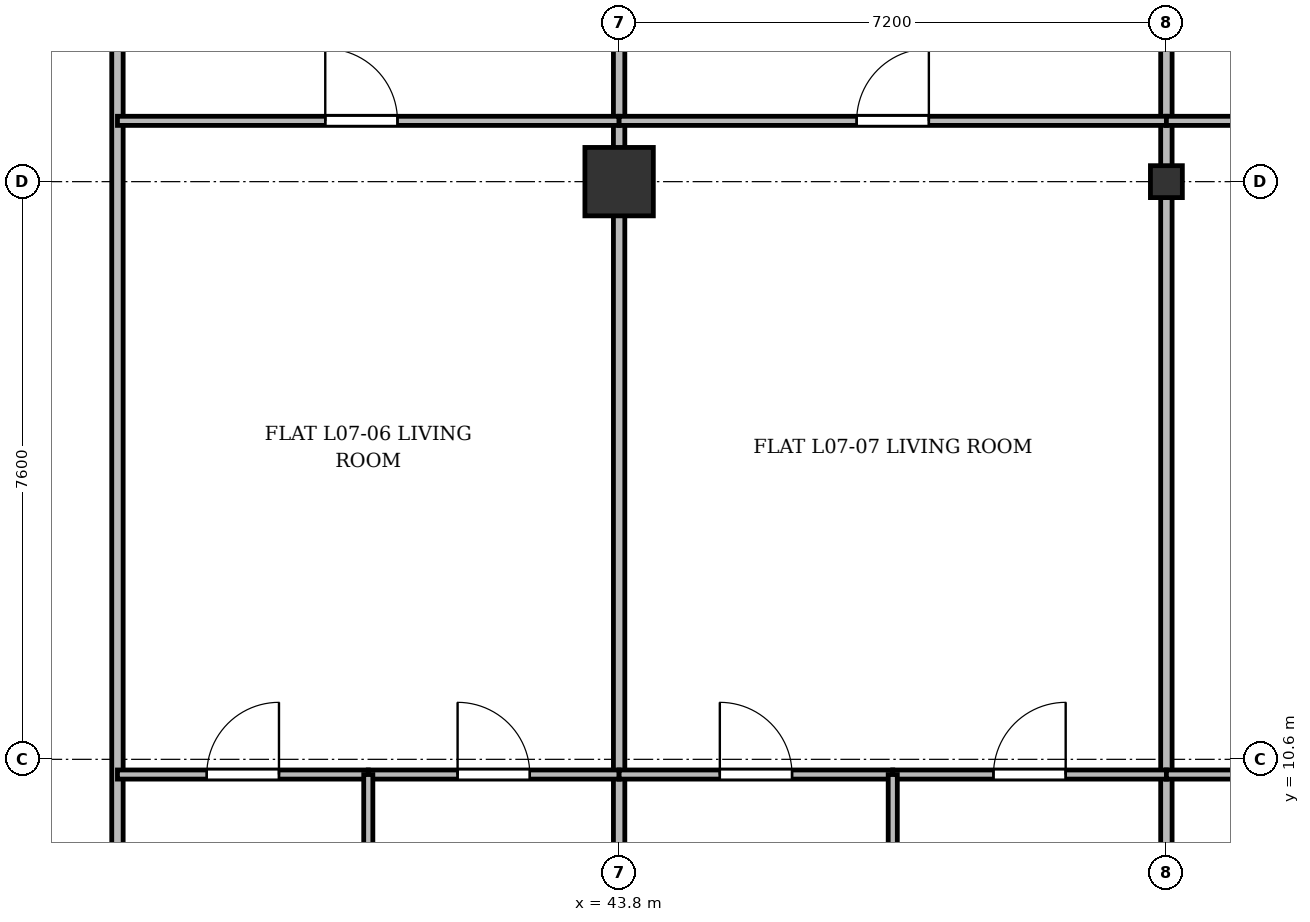
"""IFC4 building model, lengths in metres.
Left out: names, types, materials, properties, quantities, classifications, styles, units other than length and angle.
Written with IfcOpenShell. Run it as: python <this file> out.ifc"""

import sys

from ifc_helpers import new_model, si_unit, direction, frame, frame_2d, origin, origin_2d, place, context, subcontext, project, spatial, rectangle, i_section, extrude, source, transform, mapped, element, fill, save


model = new_model("IFC4")
c1 = context("Model", 3, precision=1e-05, world=origin(), true_north=direction((0.0, 1.0)))
c2 = subcontext(c1, "Body", "Model", "MODEL_VIEW")
j1 = project(units=[si_unit("LENGTHUNIT", "METRE"), si_unit("PLANEANGLEUNIT", "RADIAN")], contexts=[c1])
p1 = place(None, origin())
s1 = spatial("IfcSite", under=j1, at=p1, CompositionType="ELEMENT")
p2 = place(p1, origin())
s2 = spatial("IfcBuilding", under=s1, at=p2, CompositionType="ELEMENT")
p3 = place(p2, frame((0.0, 0.0, 30.7)))
s3 = spatial("IfcBuildingStorey", under=s2, at=p3, CompositionType="ELEMENT", Elevation=30.7)
m1 = source(origin(), c2, "Body", "SweptSolid", [
    extrude(rectangle(XDim=0.9, YDim=0.9, at=origin_2d()), origin(), (0.0, 0.0, 1.0), 3.6),
])
p4 = place(p3, frame((43.8, 18.2, 0.0), z_axis=(0.0, 0.0, 1.0), x_axis=(1.0, 0.0, 0.0)))
e1 = element("IfcColumn", 1, at=p4, inside=s3, PredefinedType="COLUMN", context=c2, shape_type="MappedRepresentation", body=[
    mapped(m1, transform((0.0, 0.0, 0.0), x_axis=(1.0, 0.0, 0.0), y_axis=(0.0, 1.0, 0.0), z_axis=(0.0, 0.0, 1.0), scale=1.0)),
])
m2 = source(origin(), c2, "Body", "SweptSolid", [
    extrude(i_section(OverallWidth=0.42, OverallDepth=0.42, WebThickness=0.026, FlangeThickness=0.04, at=origin_2d()), origin(), (0.0, 0.0, 1.0), 3.6),
])
p5 = place(p3, frame((51.0, 18.2, 0.0), z_axis=(0.0, 0.0, 1.0), x_axis=(1.0, 0.0, 0.0)))
e2 = element("IfcColumn", 2, at=p5, inside=s3, PredefinedType="COLUMN", context=c2, shape_type="MappedRepresentation", body=[
    mapped(m2, transform((0.0, 0.0, 0.0), x_axis=(1.0, 0.0, 0.0), y_axis=(0.0, 1.0, 0.0), z_axis=(0.0, 0.0, 1.0), scale=1.0)),
])
p6 = place(p3, frame((37.2, 3.145, 0.0), z_axis=(0.0, 0.0, 1.0), x_axis=(0.0, 1.0, 0.0)))
e3 = element("IfcWall", 3, at=p6, inside=s3, PredefinedType="PARTITIONING", context=c2, shape_type="SweptSolid", body=[
    extrude(rectangle(XDim=24.455, YDim=0.15, at=frame_2d((12.228, 0.0))), origin(), (0.0, 0.0, 1.0), 2.69),
])
for number, where, z_axis, x_axis in (
    (4, (43.8, 3.145, 0.0), (0.0, 0.0, 1.0), (0.0, 1.0, 0.0)),
    (5, (51.0, 3.145, 0.0), (0.0, 0.0, 1.0), (0.0, 1.0, 0.0)),
):
    element("IfcWall", number, at=place(p3, frame(where, z_axis=z_axis, x_axis=x_axis)), inside=s3, PredefinedType="PARTITIONING", context=c2, shape_type="SweptSolid", body=[
        extrude(rectangle(XDim=24.455, YDim=0.15, at=frame_2d((12.228, 0.0))), origin(), (0.0, 0.0, 1.0), 2.752),
    ])
p7 = place(p3, frame((37.2, 19.0, 0.0), z_axis=(0.0, 0.0, 1.0), x_axis=(1.0, 0.0, 0.0)))
e6 = element("IfcWall", 6, at=p7, inside=s3, PredefinedType="PARTITIONING", context=c2, shape_type="SweptSolid", body=[
    extrude(rectangle(XDim=6.6, YDim=0.12, at=frame_2d((3.3, 0.0))), origin(), (0.0, 0.0, 1.0), 2.752),
])
p8 = place(p7, frame((2.734, 0.0, 0.0)))
e7 = element("IfcOpeningElement", 7, at=p8, cuts=e6, PredefinedType="OPENING", context=c2, shape_type="SweptSolid", body=[
    extrude(rectangle(XDim=0.95, YDim=2.15, at=frame_2d((0.475, 1.075))), frame((0.0, 0.07, 0.0), z_axis=(0.0, -1.0, 0.0), x_axis=(1.0, 0.0, 0.0)), (0.0, 0.0, 1.0), 0.14),
])
p9 = place(p3, frame((37.2, 10.4, 0.0), z_axis=(0.0, 0.0, 1.0), x_axis=(1.0, 0.0, 0.0)))
e8 = element("IfcWall", 8, at=p9, inside=s3, PredefinedType="PARTITIONING", context=c2, shape_type="SweptSolid", body=[
    extrude(rectangle(XDim=3.3, YDim=0.12, at=frame_2d((1.65, 0.0))), origin(), (0.0, 0.0, 1.0), 3.34),
])
p10 = place(p9, frame((1.175, 0.0, 0.0)))
e9 = element("IfcOpeningElement", 9, at=p10, cuts=e8, PredefinedType="OPENING", context=c2, shape_type="SweptSolid", body=[
    extrude(rectangle(XDim=0.95, YDim=2.15, at=frame_2d((0.475, 1.075))), frame((0.0, 0.07, 0.0), z_axis=(0.0, -1.0, 0.0), x_axis=(1.0, 0.0, 0.0)), (0.0, 0.0, 1.0), 0.14),
])
p11 = place(p3, frame((40.5, 10.4, 0.0), z_axis=(0.0, 0.0, 1.0), x_axis=(1.0, 0.0, 0.0)))
e10 = element("IfcWall", 10, at=p11, inside=s3, PredefinedType="PARTITIONING", context=c2, shape_type="SweptSolid", body=[
    extrude(rectangle(XDim=3.3, YDim=0.12, at=frame_2d((1.65, 0.0))), origin(), (0.0, 0.0, 1.0), 2.752),
])
p12 = place(p11, frame((1.175, 0.0, 0.0)))
e11 = element("IfcOpeningElement", 11, at=p12, cuts=e10, PredefinedType="OPENING", context=c2, shape_type="SweptSolid", body=[
    extrude(rectangle(XDim=0.95, YDim=2.15, at=frame_2d((0.475, 1.075))), frame((0.0, 0.07, 0.0), z_axis=(0.0, -1.0, 0.0), x_axis=(1.0, 0.0, 0.0)), (0.0, 0.0, 1.0), 0.14),
])
p13 = place(p3, frame((40.5, 3.145, 0.0), z_axis=(0.0, 0.0, 1.0), x_axis=(0.0, 1.0, 0.0)))
e12 = element("IfcWall", 12, at=p13, inside=s3, PredefinedType="PARTITIONING", context=c2, shape_type="SweptSolid", body=[
    extrude(rectangle(XDim=7.255, YDim=0.12, at=frame_2d((3.627, 0.0))), origin(), (0.0, 0.0, 1.0), 2.69),
])
p14 = place(p3, frame((43.8, 19.0, 0.0), z_axis=(0.0, 0.0, 1.0), x_axis=(1.0, 0.0, 0.0)))
e13 = element("IfcWall", 13, at=p14, inside=s3, PredefinedType="PARTITIONING", context=c2, shape_type="SweptSolid", body=[
    extrude(rectangle(XDim=7.2, YDim=0.12, at=frame_2d((3.6, 0.0))), origin(), (0.0, 0.0, 1.0), 2.752),
])
p15 = place(p14, frame((3.125, 0.0, 0.0)))
e14 = element("IfcOpeningElement", 14, at=p15, cuts=e13, PredefinedType="OPENING", context=c2, shape_type="SweptSolid", body=[
    extrude(rectangle(XDim=0.95, YDim=2.15, at=frame_2d((0.475, 1.075))), frame((0.0, 0.07, 0.0), z_axis=(0.0, -1.0, 0.0), x_axis=(1.0, 0.0, 0.0)), (0.0, 0.0, 1.0), 0.14),
])
p16 = place(p3, frame((43.8, 10.4, 0.0), z_axis=(0.0, 0.0, 1.0), x_axis=(1.0, 0.0, 0.0)))
e15 = element("IfcWall", 15, at=p16, inside=s3, PredefinedType="PARTITIONING", context=c2, shape_type="SweptSolid", body=[
    extrude(rectangle(XDim=3.6, YDim=0.12, at=frame_2d((1.8, 0.0))), origin(), (0.0, 0.0, 1.0), 2.752),
])
p17 = place(p16, frame((1.325, 0.0, 0.0)))
e16 = element("IfcOpeningElement", 16, at=p17, cuts=e15, PredefinedType="OPENING", context=c2, shape_type="SweptSolid", body=[
    extrude(rectangle(XDim=0.95, YDim=2.15, at=frame_2d((0.475, 1.075))), frame((0.0, 0.07, 0.0), z_axis=(0.0, -1.0, 0.0), x_axis=(1.0, 0.0, 0.0)), (0.0, 0.0, 1.0), 0.14),
])
p18 = place(p3, frame((47.4, 10.4, 0.0), z_axis=(0.0, 0.0, 1.0), x_axis=(1.0, 0.0, 0.0)))
e17 = element("IfcWall", 17, at=p18, inside=s3, PredefinedType="PARTITIONING", context=c2, shape_type="SweptSolid", body=[
    extrude(rectangle(XDim=3.6, YDim=0.12, at=frame_2d((1.8, 0.0))), origin(), (0.0, 0.0, 1.0), 2.752),
])
p19 = place(p18, frame((1.325, 0.0, 0.0)))
e18 = element("IfcOpeningElement", 18, at=p19, cuts=e17, PredefinedType="OPENING", context=c2, shape_type="SweptSolid", body=[
    extrude(rectangle(XDim=0.95, YDim=2.15, at=frame_2d((0.475, 1.075))), frame((0.0, 0.07, 0.0), z_axis=(0.0, -1.0, 0.0), x_axis=(1.0, 0.0, 0.0)), (0.0, 0.0, 1.0), 0.14),
])
p20 = place(p3, frame((47.4, 3.145, 0.0), z_axis=(0.0, 0.0, 1.0), x_axis=(0.0, 1.0, 0.0)))
e19 = element("IfcWall", 19, at=p20, inside=s3, PredefinedType="PARTITIONING", context=c2, shape_type="SweptSolid", body=[
    extrude(rectangle(XDim=7.255, YDim=0.12, at=frame_2d((3.627, 0.0))), origin(), (0.0, 0.0, 1.0), 2.69),
])
p21 = place(p3, frame((51.0, 19.0, 0.0), z_axis=(0.0, 0.0, 1.0), x_axis=(1.0, 0.0, 0.0)))
e20 = element("IfcWall", 20, at=p21, inside=s3, PredefinedType="PARTITIONING", context=c2, shape_type="SweptSolid", body=[
    extrude(rectangle(XDim=7.8, YDim=0.12, at=frame_2d((3.9, 0.0))), origin(), (0.0, 0.0, 1.0), 2.752),
])
p22 = place(p21, frame((3.333, 0.0, 0.0)))
e21 = element("IfcOpeningElement", 21, at=p22, cuts=e20, PredefinedType="OPENING", context=c2, shape_type="SweptSolid", body=[
    extrude(rectangle(XDim=0.95, YDim=2.15, at=frame_2d((0.475, 1.075))), frame((0.0, 0.07, 0.0), z_axis=(0.0, -1.0, 0.0), x_axis=(1.0, 0.0, 0.0)), (0.0, 0.0, 1.0), 0.14),
])
p23 = place(p3, frame((51.0, 10.4, 0.0), z_axis=(0.0, 0.0, 1.0), x_axis=(1.0, 0.0, 0.0)))
e22 = element("IfcWall", 22, at=p23, inside=s3, PredefinedType="PARTITIONING", context=c2, shape_type="SweptSolid", body=[
    extrude(rectangle(XDim=3.9, YDim=0.12, at=frame_2d((1.95, 0.0))), origin(), (0.0, 0.0, 1.0), 2.752),
])
p24 = place(p23, frame((1.475, 0.0, 0.0)))
e23 = element("IfcOpeningElement", 23, at=p24, cuts=e22, PredefinedType="OPENING", context=c2, shape_type="SweptSolid", body=[
    extrude(rectangle(XDim=0.95, YDim=2.15, at=frame_2d((0.475, 1.075))), frame((0.0, 0.07, 0.0), z_axis=(0.0, -1.0, 0.0), x_axis=(1.0, 0.0, 0.0)), (0.0, 0.0, 1.0), 0.14),
])
m3 = source(origin(), c2, "Body", "SweptSolid", [
    extrude(rectangle(XDim=0.95, YDim=2.15, at=frame_2d((0.475, 1.075))), frame((0.0, 0.025, 0.0), z_axis=(0.0, -1.0, 0.0), x_axis=(1.0, 0.0, 0.0)), (0.0, 0.0, 1.0), 0.05),
])
p25 = place(p8, origin())
e24 = element("IfcDoor", 24, at=p25, inside=s3, OperationType="SINGLE_SWING_LEFT", PredefinedType="DOOR", context=c2, shape_type="MappedRepresentation", body=[
    mapped(m3, transform((0.0, 0.0, 0.0), x_axis=(1.0, 0.0, 0.0), y_axis=(0.0, 1.0, 0.0), z_axis=(0.0, 0.0, 1.0), scale=1.0)),
])
fill(e7, e24)
p26 = place(p10, origin())
e25 = element("IfcDoor", 25, at=p26, inside=s3, OperationType="SINGLE_SWING_RIGHT", PredefinedType="DOOR", context=c2, shape_type="MappedRepresentation", body=[
    mapped(m3, transform((0.0, 0.0, 0.0), x_axis=(1.0, 0.0, 0.0), y_axis=(0.0, 1.0, 0.0), z_axis=(0.0, 0.0, 1.0), scale=1.0)),
])
fill(e9, e25)
p27 = place(p12, origin())
e26 = element("IfcDoor", 26, at=p27, inside=s3, OperationType="SINGLE_SWING_LEFT", PredefinedType="DOOR", context=c2, shape_type="MappedRepresentation", body=[
    mapped(m3, transform((0.0, 0.0, 0.0), x_axis=(1.0, 0.0, 0.0), y_axis=(0.0, 1.0, 0.0), z_axis=(0.0, 0.0, 1.0), scale=1.0)),
])
fill(e11, e26)
p28 = place(p15, origin())
e27 = element("IfcDoor", 27, at=p28, inside=s3, OperationType="SINGLE_SWING_RIGHT", PredefinedType="DOOR", context=c2, shape_type="MappedRepresentation", body=[
    mapped(m3, transform((0.0, 0.0, 0.0), x_axis=(1.0, 0.0, 0.0), y_axis=(0.0, 1.0, 0.0), z_axis=(0.0, 0.0, 1.0), scale=1.0)),
])
fill(e14, e27)
p29 = place(p17, origin())
e28 = element("IfcDoor", 28, at=p29, inside=s3, OperationType="SINGLE_SWING_LEFT", PredefinedType="DOOR", context=c2, shape_type="MappedRepresentation", body=[
    mapped(m3, transform((0.0, 0.0, 0.0), x_axis=(1.0, 0.0, 0.0), y_axis=(0.0, 1.0, 0.0), z_axis=(0.0, 0.0, 1.0), scale=1.0)),
])
fill(e16, e28)
p30 = place(p19, origin())
e29 = element("IfcDoor", 29, at=p30, inside=s3, OperationType="SINGLE_SWING_RIGHT", PredefinedType="DOOR", context=c2, shape_type="MappedRepresentation", body=[
    mapped(m3, transform((0.0, 0.0, 0.0), x_axis=(1.0, 0.0, 0.0), y_axis=(0.0, 1.0, 0.0), z_axis=(0.0, 0.0, 1.0), scale=1.0)),
])
fill(e18, e29)
save(model, sys.argv[1])
